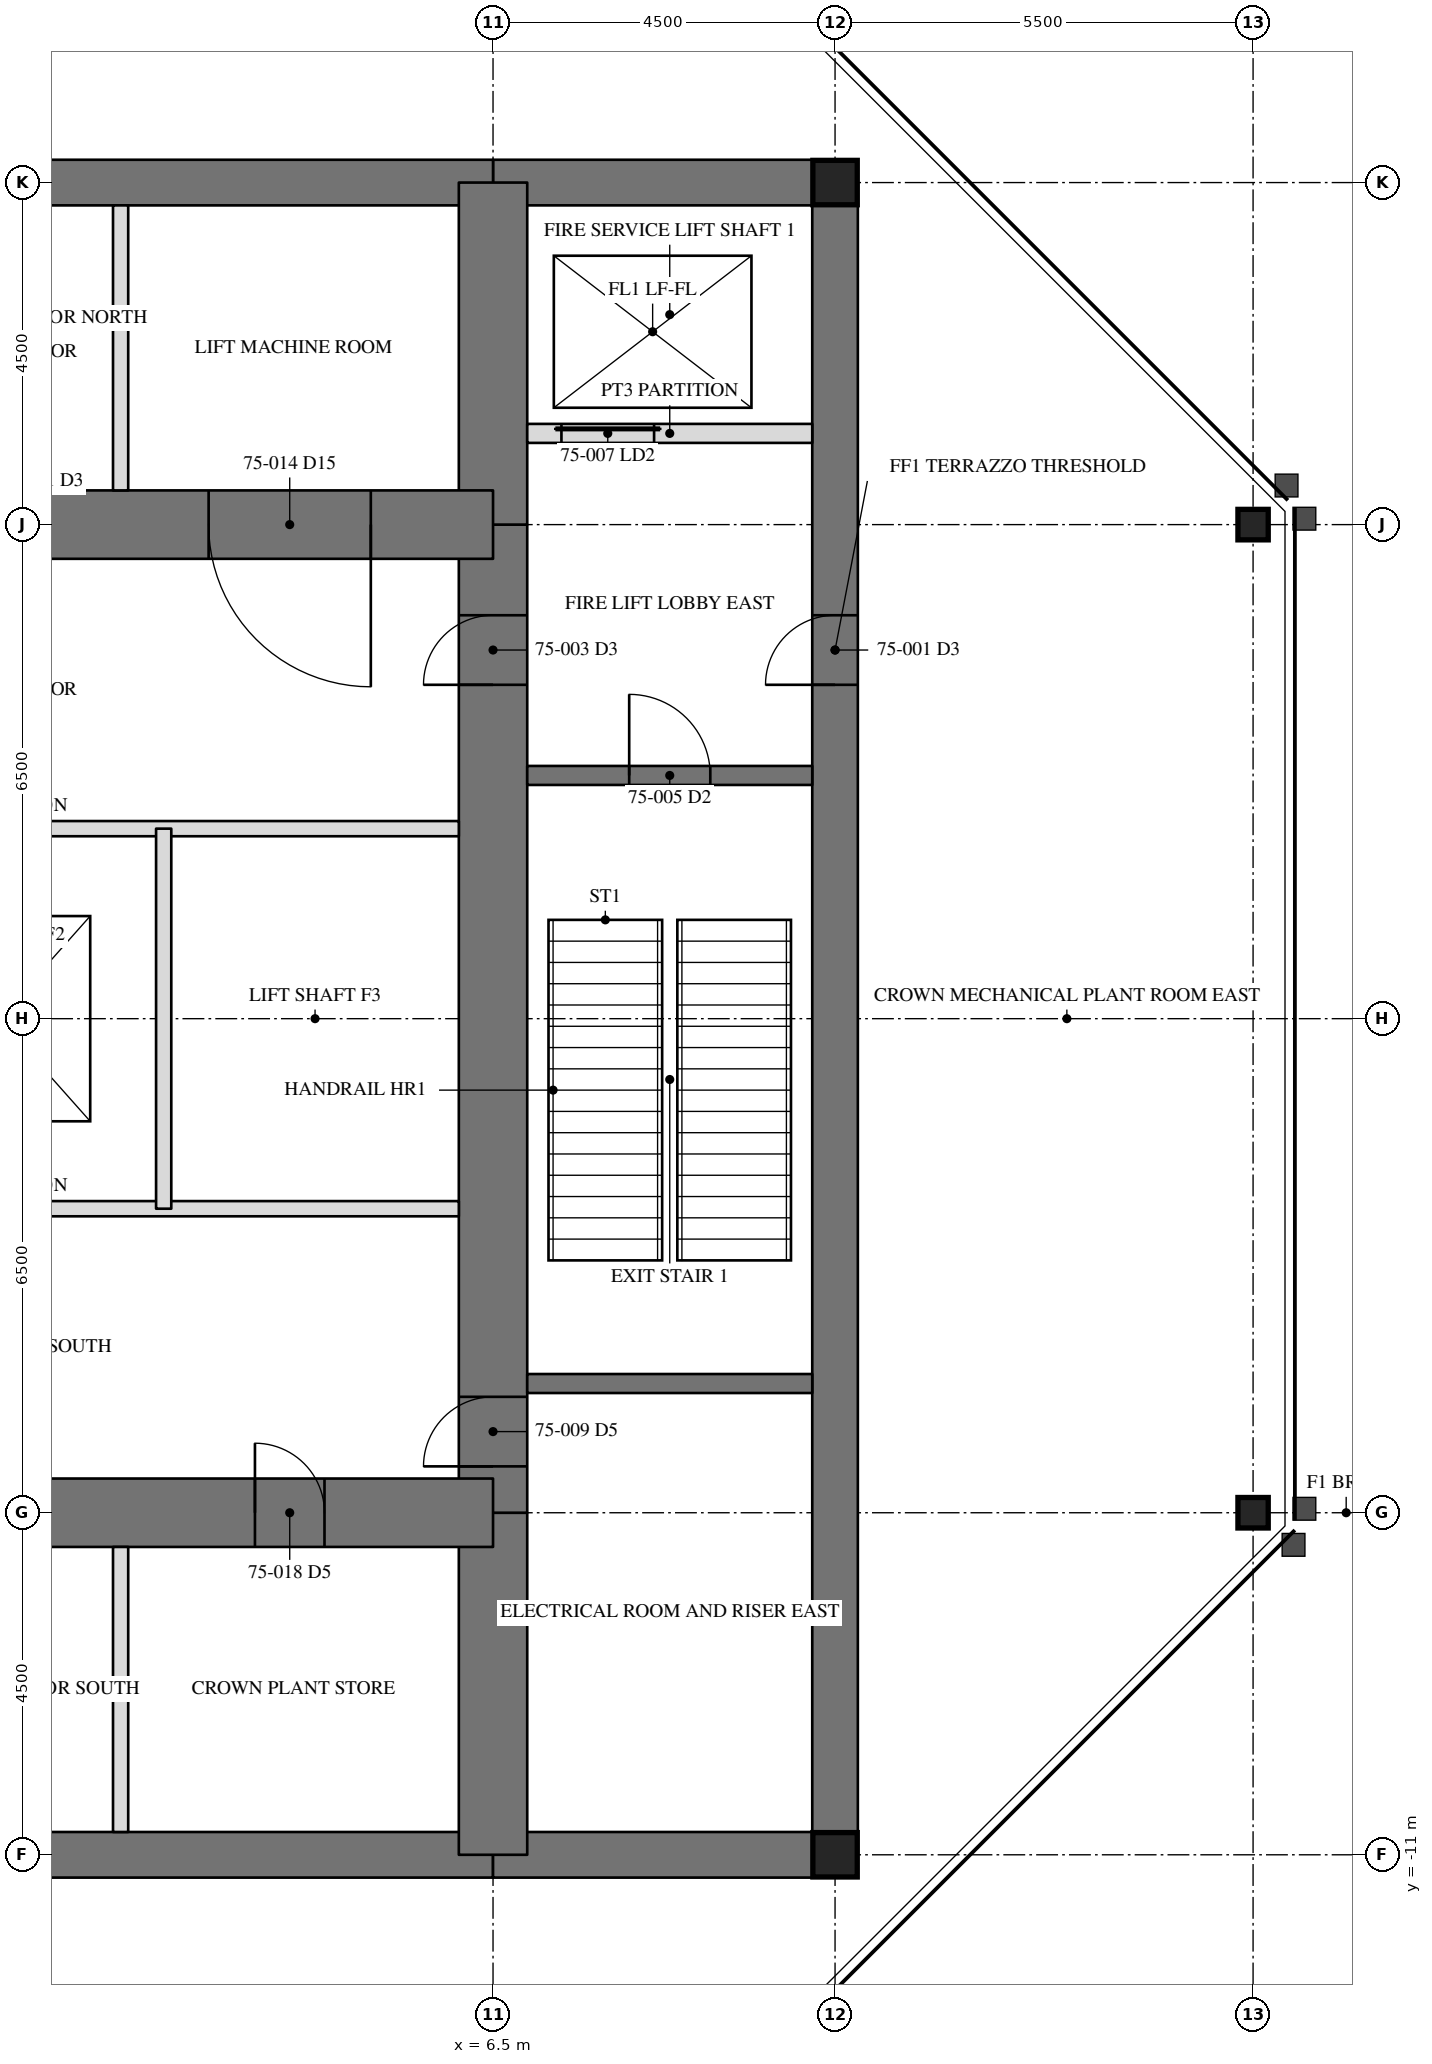
"""IFC4 building model, lengths in metres.
Left out: names, types, materials, properties, quantities, classifications, styles, units other than length and angle.
Written with IfcOpenShell. Run it as: python <this file> out.ifc"""

import sys

from ifc_helpers import new_model, si_unit, direction, frame, frame_2d, origin, origin_2d, place, context, subcontext, project, spatial, rectangle, hollow_rectangle, i_section, extrude, element, fill, save


model = new_model("IFC4")
c1 = context("Model", 3, precision=1e-05, world=origin(), true_north=direction((0.0, 1.0)))
c2 = subcontext(c1, "Body", "Model", "MODEL_VIEW")
j1 = project(units=[si_unit("LENGTHUNIT", "METRE"), si_unit("PLANEANGLEUNIT", "RADIAN")], contexts=[c1])
p1 = place(None, origin())
s1 = spatial("IfcSite", under=j1, at=p1, CompositionType="ELEMENT")
p2 = place(p1, origin())
s2 = spatial("IfcBuilding", under=s1, at=p2, CompositionType="ELEMENT")
p3 = place(p2, frame((0.0, 0.0, 304.2)))
s3 = spatial("IfcBuildingStorey", under=s2, at=p3, CompositionType="ELEMENT", Elevation=304.2)
for number, where, z_axis, x_axis in (
    (1, (16.5, -6.5, 0.0), (0.0, 0.0, 1.0), (0.0, 1.0, 0.0)),
    (2, (16.5, 6.5, 0.0), (0.0, 0.0, 1.0), (0.0, 1.0, 0.0)),
):
    element("IfcColumn", number, at=place(p3, frame(where, z_axis=z_axis, x_axis=x_axis)), inside=s3, PredefinedType="COLUMN", context=c2, shape_type="SweptSolid", body=[
        extrude(i_section(OverallWidth=0.401, OverallDepth=0.399, WebThickness=0.025, FlangeThickness=0.04, at=origin_2d()), origin(), (0.0, 0.0, 1.0), 6.0),
    ])
p4 = place(p3, frame((11.0, -11.0, 0.0), z_axis=(0.0, 0.0, 1.0), x_axis=(0.0, 1.0, 0.0)))
e3 = element("IfcWall", 3, at=p4, inside=s3, PredefinedType="SHEAR", context=c2, shape_type="SweptSolid", body=[
    extrude(rectangle(XDim=22.0, YDim=0.6, at=frame_2d((11.0, 0.0))), origin(), (0.0, 0.0, 1.0), 6.0),
])
p5 = place(p4, frame((15.393, 0.0, 0.0)))
e4 = element("IfcOpeningElement", 4, at=p5, cuts=e3, PredefinedType="OPENING", context=c2, shape_type="SweptSolid", body=[
    extrude(rectangle(XDim=0.915, YDim=2.134, at=frame_2d((0.458, 1.067))), frame((0.0, 0.31, 0.0), z_axis=(0.0, -1.0, 0.0), x_axis=(1.0, 0.0, 0.0)), (0.0, 0.0, 1.0), 0.62),
])
p6 = place(p3, frame((11.0, 11.0, 0.0), z_axis=(0.0, 0.0, 1.0), x_axis=(-1.0, 0.0, 0.0)))
e5 = element("IfcWall", 5, at=p6, inside=s3, PredefinedType="SHEAR", context=c2, shape_type="SweptSolid", body=[
    extrude(rectangle(XDim=4.5, YDim=0.6, at=frame_2d((2.25, 0.0))), origin(), (0.0, 0.0, 1.0), 6.0),
])
p7 = place(p3, frame((6.5, 11.0, 0.0), z_axis=(0.0, 0.0, 1.0), x_axis=(-1.0, 0.0, 0.0)))
e6 = element("IfcWall", 6, at=p7, inside=s3, PredefinedType="SHEAR", context=c2, shape_type="SweptSolid", body=[
    extrude(rectangle(XDim=13.0, YDim=0.6, at=frame_2d((6.5, 0.0))), origin(), (0.0, 0.0, 1.0), 6.0),
])
p8 = place(p7, frame((6.042, 0.0, 0.0)))
e7 = element("IfcOpeningElement", 7, at=p8, cuts=e6, PredefinedType="OPENING", context=c2, shape_type="SweptSolid", body=[
    extrude(rectangle(XDim=0.915, YDim=2.134, at=frame_2d((0.458, 1.067))), frame((0.0, 0.31, 0.0), z_axis=(0.0, -1.0, 0.0), x_axis=(1.0, 0.0, 0.0)), (0.0, 0.0, 1.0), 0.62),
])
p9 = place(p3, frame((-6.5, -11.0, 0.0), z_axis=(0.0, 0.0, 1.0), x_axis=(1.0, 0.0, 0.0)))
e8 = element("IfcWall", 8, at=p9, inside=s3, PredefinedType="SHEAR", context=c2, shape_type="SweptSolid", body=[
    extrude(rectangle(XDim=13.0, YDim=0.6, at=frame_2d((6.5, 0.0))), origin(), (0.0, 0.0, 1.0), 6.0),
])
p10 = place(p9, frame((6.042, 0.0, 0.0)))
e9 = element("IfcOpeningElement", 9, at=p10, cuts=e8, PredefinedType="OPENING", context=c2, shape_type="SweptSolid", body=[
    extrude(rectangle(XDim=0.915, YDim=2.134, at=frame_2d((0.458, 1.067))), frame((0.0, 0.31, 0.0), z_axis=(0.0, -1.0, 0.0), x_axis=(1.0, 0.0, 0.0)), (0.0, 0.0, 1.0), 0.62),
])
p11 = place(p3, frame((6.5, -11.0, 0.0), z_axis=(0.0, 0.0, 1.0), x_axis=(1.0, 0.0, 0.0)))
e10 = element("IfcWall", 10, at=p11, inside=s3, PredefinedType="SHEAR", context=c2, shape_type="SweptSolid", body=[
    extrude(rectangle(XDim=4.5, YDim=0.6, at=frame_2d((2.25, 0.0))), origin(), (0.0, 0.0, 1.0), 6.0),
])
p12 = place(p3, frame((6.5, -11.0, 0.0), z_axis=(0.0, 0.0, 1.0), x_axis=(0.0, 1.0, 0.0)))
e11 = element("IfcWall", 11, at=p12, inside=s3, PredefinedType="SHEAR", context=c2, shape_type="SweptSolid", body=[
    extrude(rectangle(XDim=4.5, YDim=0.9, at=frame_2d((2.25, 0.0))), origin(), (0.0, 0.0, 1.0), 6.0),
])
p13 = place(p3, frame((6.5, -6.5, 0.0), z_axis=(0.0, 0.0, 1.0), x_axis=(0.0, 1.0, 0.0)))
e12 = element("IfcWall", 12, at=p13, inside=s3, PredefinedType="SHEAR", context=c2, shape_type="SweptSolid", body=[
    extrude(rectangle(XDim=13.0, YDim=0.9, at=frame_2d((6.5, 0.0))), origin(), (0.0, 0.0, 1.0), 6.0),
])
p14 = place(p13, frame((10.893, 0.0, 0.0)))
e13 = element("IfcOpeningElement", 13, at=p14, cuts=e12, PredefinedType="OPENING", context=c2, shape_type="SweptSolid", body=[
    extrude(rectangle(XDim=0.915, YDim=2.134, at=frame_2d((0.458, 1.067))), frame((0.0, 0.46, 0.0), z_axis=(0.0, -1.0, 0.0), x_axis=(1.0, 0.0, 0.0)), (0.0, 0.0, 1.0), 0.92),
])
p15 = place(p13, frame((0.61, 0.0, 0.0)))
e14 = element("IfcOpeningElement", 14, at=p15, cuts=e12, PredefinedType="OPENING", context=c2, shape_type="SweptSolid", body=[
    extrude(rectangle(XDim=0.915, YDim=2.134, at=frame_2d((0.458, 1.067))), frame((0.0, 0.46, 0.0), z_axis=(0.0, -1.0, 0.0), x_axis=(1.0, 0.0, 0.0)), (0.0, 0.0, 1.0), 0.92),
])
p16 = place(p3, frame((6.5, 6.5, 0.0), z_axis=(0.0, 0.0, 1.0), x_axis=(0.0, 1.0, 0.0)))
e15 = element("IfcWall", 15, at=p16, inside=s3, PredefinedType="SHEAR", context=c2, shape_type="SweptSolid", body=[
    extrude(rectangle(XDim=4.5, YDim=0.9, at=frame_2d((2.25, 0.0))), origin(), (0.0, 0.0, 1.0), 6.0),
])
p17 = place(p3, frame((6.5, 6.5, 0.0), z_axis=(0.0, 0.0, 1.0), x_axis=(-1.0, 0.0, 0.0)))
e16 = element("IfcWall", 16, at=p17, inside=s3, PredefinedType="SHEAR", context=c2, shape_type="SweptSolid", body=[
    extrude(rectangle(XDim=13.0, YDim=0.9, at=frame_2d((6.5, 0.0))), origin(), (0.0, 0.0, 1.0), 6.0),
])
p18 = place(p17, frame((6.042, 0.0, 0.0)))
e17 = element("IfcOpeningElement", 17, at=p18, cuts=e16, PredefinedType="OPENING", context=c2, shape_type="SweptSolid", body=[
    extrude(rectangle(XDim=0.915, YDim=2.134, at=frame_2d((0.458, 1.067))), frame((0.0, 0.46, 0.0), z_axis=(0.0, -1.0, 0.0), x_axis=(1.0, 0.0, 0.0)), (0.0, 0.0, 1.0), 0.92),
])
p19 = place(p17, frame((9.258, 0.0, 0.0)))
e18 = element("IfcOpeningElement", 18, at=p19, cuts=e16, PredefinedType="OPENING", context=c2, shape_type="SweptSolid", body=[
    extrude(rectangle(XDim=2.134, YDim=2.438, at=frame_2d((1.067, 1.219))), frame((0.0, 0.46, 0.0), z_axis=(0.0, -1.0, 0.0), x_axis=(1.0, 0.0, 0.0)), (0.0, 0.0, 1.0), 0.92),
])
p20 = place(p17, frame((1.608, 0.0, 0.0)))
e19 = element("IfcOpeningElement", 19, at=p20, cuts=e16, PredefinedType="OPENING", context=c2, shape_type="SweptSolid", body=[
    extrude(rectangle(XDim=2.134, YDim=2.438, at=frame_2d((1.067, 1.219))), frame((0.0, 0.46, 0.0), z_axis=(0.0, -1.0, 0.0), x_axis=(1.0, 0.0, 0.0)), (0.0, 0.0, 1.0), 0.92),
])
p21 = place(p3, frame((-6.5, -6.5, 0.0), z_axis=(0.0, 0.0, 1.0), x_axis=(1.0, 0.0, 0.0)))
e20 = element("IfcWall", 20, at=p21, inside=s3, PredefinedType="SHEAR", context=c2, shape_type="SweptSolid", body=[
    extrude(rectangle(XDim=13.0, YDim=0.9, at=frame_2d((6.5, 0.0))), origin(), (0.0, 0.0, 1.0), 6.0),
])
p22 = place(p21, frame((6.042, 0.0, 0.0)))
e21 = element("IfcOpeningElement", 21, at=p22, cuts=e20, PredefinedType="OPENING", context=c2, shape_type="SweptSolid", body=[
    extrude(rectangle(XDim=0.915, YDim=2.134, at=frame_2d((0.458, 1.067))), frame((0.0, 0.46, 0.0), z_axis=(0.0, -1.0, 0.0), x_axis=(1.0, 0.0, 0.0)), (0.0, 0.0, 1.0), 0.92),
])
p23 = place(p21, frame((2.218, 0.0, 0.0)))
e22 = element("IfcOpeningElement", 22, at=p23, cuts=e20, PredefinedType="OPENING", context=c2, shape_type="SweptSolid", body=[
    extrude(rectangle(XDim=0.915, YDim=2.134, at=frame_2d((0.458, 1.067))), frame((0.0, 0.46, 0.0), z_axis=(0.0, -1.0, 0.0), x_axis=(1.0, 0.0, 0.0)), (0.0, 0.0, 1.0), 0.92),
])
p24 = place(p21, frame((9.867, 0.0, 0.0)))
e23 = element("IfcOpeningElement", 23, at=p24, cuts=e20, PredefinedType="OPENING", context=c2, shape_type="SweptSolid", body=[
    extrude(rectangle(XDim=0.915, YDim=2.134, at=frame_2d((0.458, 1.067))), frame((0.0, 0.46, 0.0), z_axis=(0.0, -1.0, 0.0), x_axis=(1.0, 0.0, 0.0)), (0.0, 0.0, 1.0), 0.92),
])
for number, where, z_axis, x_axis in (
    (24, (11.0, 11.0, 0.0), (0.0, 0.0, 1.0), (1.0, 0.0, 0.0)),
    (25, (11.0, -11.0, 0.0), (0.0, 0.0, 1.0), (1.0, 0.0, 0.0)),
):
    element("IfcColumn", number, at=place(p3, frame(where, z_axis=z_axis, x_axis=x_axis)), inside=s3, PredefinedType="COLUMN", context=c2, shape_type="SweptSolid", body=[
        extrude(hollow_rectangle(XDim=0.584, YDim=0.584, WallThickness=0.051, at=origin_2d()), origin(), (0.0, 0.0, 1.0), 6.0),
    ])
p25 = place(p3, frame((6.95, -4.8, 0.0), z_axis=(0.0, 0.0, 1.0), x_axis=(1.0, 0.0, 0.0)))
e26 = element("IfcWall", 26, at=p25, inside=s3, PredefinedType="SOLIDWALL", context=c2, shape_type="SweptSolid", body=[
    extrude(rectangle(XDim=3.75, YDim=0.25, at=frame_2d((1.875, 0.0))), origin(), (0.0, 0.0, 1.0), 5.81),
])
p26 = place(p3, frame((6.95, 3.2, 0.0), z_axis=(0.0, 0.0, 1.0), x_axis=(1.0, 0.0, 0.0)))
e27 = element("IfcWall", 27, at=p26, inside=s3, PredefinedType="SOLIDWALL", context=c2, shape_type="SweptSolid", body=[
    extrude(rectangle(XDim=3.75, YDim=0.25, at=frame_2d((1.875, 0.0))), origin(), (0.0, 0.0, 1.0), 5.81),
])
p27 = place(p26, frame((1.342, 0.0, 0.0)))
e28 = element("IfcOpeningElement", 28, at=p27, cuts=e27, PredefinedType="OPENING", context=c2, shape_type="SweptSolid", body=[
    extrude(rectangle(XDim=1.067, YDim=2.134, at=frame_2d((0.533, 1.067))), frame((0.0, 0.135, 0.0), z_axis=(0.0, -1.0, 0.0), x_axis=(1.0, 0.0, 0.0)), (0.0, 0.0, 1.0), 0.27),
])
p28 = place(p3, frame((6.95, 7.7, 0.0), z_axis=(0.0, 0.0, 1.0), x_axis=(1.0, 0.0, 0.0)))
e29 = element("IfcWall", 29, at=p28, inside=s3, PredefinedType="PARTITIONING", context=c2, shape_type="SweptSolid", body=[
    extrude(rectangle(XDim=3.75, YDim=0.25, at=frame_2d((1.875, 0.0))), origin(), (0.0, 0.0, 1.0), 5.81),
])
p29 = place(p28, frame((0.45, 0.0, 0.0)))
e30 = element("IfcOpeningElement", 30, at=p29, cuts=e29, PredefinedType="OPENING", context=c2, shape_type="SweptSolid", body=[
    extrude(rectangle(XDim=1.219, YDim=2.134, at=frame_2d((0.609, 1.067))), frame((0.0, 0.135, 0.0), z_axis=(0.0, -1.0, 0.0), x_axis=(1.0, 0.0, 0.0)), (0.0, 0.0, 1.0), 0.27),
])
for number, where, z_axis, x_axis in (
    (31, (-6.05, 2.5, 0.0), (0.0, 0.0, 1.0), (1.0, 0.0, 0.0)),
    (32, (6.05, -2.5, 0.0), (0.0, 0.0, 1.0), (-1.0, 0.0, 0.0)),
):
    element("IfcWall", number, at=place(p3, frame(where, z_axis=z_axis, x_axis=x_axis)), inside=s3, PredefinedType="PARTITIONING", context=c2, shape_type="SweptSolid", body=[
        extrude(rectangle(XDim=12.1, YDim=0.2, at=frame_2d((6.05, 0.0))), origin(), (0.0, 0.0, 1.0), 5.81),
    ])
p30 = place(p3, frame((2.167, -2.5, 0.0), z_axis=(0.0, 0.0, 1.0), x_axis=(0.0, 1.0, 0.0)))
e33 = element("IfcWall", 33, at=p30, inside=s3, PredefinedType="PARTITIONING", context=c2, shape_type="SweptSolid", body=[
    extrude(rectangle(XDim=5.0, YDim=0.2, at=frame_2d((2.5, 0.0))), origin(), (0.0, 0.0, 1.0), 5.81),
])
for number, where, z_axis, x_axis in (
    (34, (1.6, 6.95, 0.0), (0.0, 0.0, 1.0), (0.0, 1.0, 0.0)),
    (35, (1.6, -6.95, 0.0), (0.0, 0.0, 1.0), (0.0, -1.0, 0.0)),
):
    element("IfcWall", number, at=place(p3, frame(where, z_axis=z_axis, x_axis=x_axis)), inside=s3, PredefinedType="PARTITIONING", context=c2, shape_type="SweptSolid", body=[
        extrude(rectangle(XDim=3.75, YDim=0.2, at=frame_2d((1.875, 0.0))), origin(), (0.0, 0.0, 1.0), 5.81),
    ])
p31 = place(p5, origin())
e36 = element("IfcDoor", 36, at=p31, inside=s3, OperationType="SINGLE_SWING_RIGHT", PredefinedType="DOOR", context=c2, shape_type="SweptSolid", body=[
    extrude(rectangle(XDim=0.915, YDim=2.134, at=frame_2d((0.458, 1.067))), frame((0.0, -0.225, 0.0), z_axis=(0.0, -1.0, 0.0), x_axis=(1.0, 0.0, 0.0)), (0.0, 0.0, 1.0), 0.05),
])
fill(e4, e36)
p32 = place(p14, origin())
e37 = element("IfcDoor", 37, at=p32, inside=s3, OperationType="SINGLE_SWING_RIGHT", PredefinedType="DOOR", context=c2, shape_type="SweptSolid", body=[
    extrude(rectangle(XDim=0.915, YDim=2.134, at=frame_2d((0.458, 1.067))), frame((0.0, -0.375, 0.0), z_axis=(0.0, -1.0, 0.0), x_axis=(1.0, 0.0, 0.0)), (0.0, 0.0, 1.0), 0.05),
])
fill(e13, e37)
p33 = place(p27, origin())
e38 = element("IfcDoor", 38, at=p33, inside=s3, OperationType="SINGLE_SWING_LEFT", PredefinedType="DOOR", context=c2, shape_type="SweptSolid", body=[
    extrude(rectangle(XDim=1.067, YDim=2.134, at=frame_2d((0.533, 1.067))), frame((0.0, 0.025, 0.0), z_axis=(0.0, -1.0, 0.0), x_axis=(1.0, 0.0, 0.0)), (0.0, 0.0, 1.0), 0.05),
])
fill(e28, e38)
p34 = place(p29, origin())
e39 = element("IfcDoor", 39, at=p34, inside=s3, OperationType="SLIDING_TO_LEFT", PredefinedType="DOOR", context=c2, shape_type="SweptSolid", body=[
    extrude(rectangle(XDim=1.219, YDim=2.134, at=frame_2d((0.609, 1.067))), frame((0.0, 0.025, 0.0), z_axis=(0.0, -1.0, 0.0), x_axis=(1.0, 0.0, 0.0)), (0.0, 0.0, 1.0), 0.05),
])
fill(e30, e39)
p35 = place(p15, origin())
e40 = element("IfcDoor", 40, at=p35, inside=s3, OperationType="SINGLE_SWING_RIGHT", PredefinedType="DOOR", context=c2, shape_type="SweptSolid", body=[
    extrude(rectangle(XDim=0.915, YDim=2.134, at=frame_2d((0.458, 1.067))), frame((0.0, -0.375, 0.0), z_axis=(0.0, -1.0, 0.0), x_axis=(1.0, 0.0, 0.0)), (0.0, 0.0, 1.0), 0.05),
])
fill(e14, e40)
p36 = place(p20, origin())
e41 = element("IfcDoor", 41, at=p36, inside=s3, OperationType="DOUBLE_DOOR_SINGLE_SWING", PredefinedType="DOOR", context=c2, shape_type="SweptSolid", body=[
    extrude(rectangle(XDim=2.134, YDim=2.438, at=frame_2d((1.067, 1.219))), frame((0.0, -0.375, 0.0), z_axis=(0.0, -1.0, 0.0), x_axis=(1.0, 0.0, 0.0)), (0.0, 0.0, 1.0), 0.05),
])
fill(e19, e41)
p37 = place(p24, origin())
e42 = element("IfcDoor", 42, at=p37, inside=s3, OperationType="SINGLE_SWING_RIGHT", PredefinedType="DOOR", context=c2, shape_type="SweptSolid", body=[
    extrude(rectangle(XDim=0.915, YDim=2.134, at=frame_2d((0.458, 1.067))), frame((0.0, -0.375, 0.0), z_axis=(0.0, -1.0, 0.0), x_axis=(1.0, 0.0, 0.0)), (0.0, 0.0, 1.0), 0.05),
])
fill(e23, e42)
save(model, sys.argv[1])
